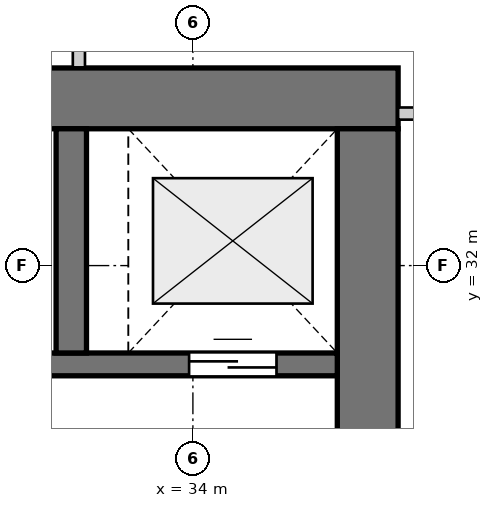
"""IFC4 building model, lengths in metres.
Left out: names, types, materials, properties, quantities, classifications, styles, units other than length and angle.
Written with IfcOpenShell. Run it as: python <this file> out.ifc"""

import sys

from ifc_helpers import new_model, si_unit, direction, frame, frame_2d, origin, place, context, subcontext, project, spatial, rectangle, extrude, source, transform, mapped, element, fill, save


model = new_model("IFC4")
c1 = context("Model", 3, precision=1e-05, world=origin(), true_north=direction((0.0, 1.0)))
c2 = subcontext(c1, "Body", "Model", "MODEL_VIEW")
j1 = project(units=[si_unit("LENGTHUNIT", "METRE"), si_unit("PLANEANGLEUNIT", "RADIAN")], contexts=[c1])
p1 = place(None, origin())
s1 = spatial("IfcSite", under=j1, at=p1, CompositionType="ELEMENT")
p2 = place(p1, origin())
s2 = spatial("IfcBuilding", under=s1, at=p2, CompositionType="ELEMENT")
p3 = place(p2, frame((0.0, 0.0, -4.2)))
s3 = spatial("IfcBuildingStorey", under=s2, at=p3, CompositionType="ELEMENT", Elevation=-4.2)
p4 = place(p3, frame((36.7, 34.2, 0.0), z_axis=(0.0, 0.0, 1.0), x_axis=(-1.0, 0.0, 0.0)))
e1 = element("IfcWall", 1, at=p4, inside=s3, PredefinedType="SHEAR", context=c2, shape_type="SweptSolid", body=[
    extrude(rectangle(XDim=12.7, YDim=0.8, at=frame_2d((6.35, 0.0))), origin(), (0.0, 0.0, 1.0), 3.9),
])
p5 = place(p3, frame((36.3, 18.2, 0.0), z_axis=(0.0, 0.0, 1.0), x_axis=(0.0, 1.0, 0.0)))
e2 = element("IfcWall", 2, at=p5, inside=s3, PredefinedType="SHEAR", context=c2, shape_type="SweptSolid", body=[
    extrude(rectangle(XDim=15.6, YDim=0.8, at=frame_2d((7.8, 0.0))), origin(), (0.0, 0.0, 1.0), 3.9),
])
p6 = place(p5, frame((4.25, 0.0, 0.0)))
e3 = element("IfcOpeningElement", 3, at=p6, cuts=e2, PredefinedType="OPENING", context=c2, shape_type="SweptSolid", body=[
    extrude(rectangle(XDim=1.1, YDim=2.15, at=frame_2d((0.55, 1.075))), frame((0.0, 0.41, 0.0), z_axis=(0.0, -1.0, 0.0), x_axis=(1.0, 0.0, 0.0)), (0.0, 0.0, 1.0), 0.82),
])
p7 = place(p5, frame((10.25, 0.0, 0.0)))
e4 = element("IfcOpeningElement", 4, at=p7, cuts=e2, PredefinedType="OPENING", context=c2, shape_type="SweptSolid", body=[
    extrude(rectangle(XDim=1.1, YDim=2.15, at=frame_2d((0.55, 1.075))), frame((0.0, 0.41, 0.0), z_axis=(0.0, -1.0, 0.0), x_axis=(1.0, 0.0, 0.0)), (0.0, 0.0, 1.0), 0.82),
])
p8 = place(p3, frame((24.8, 30.7, 0.0), z_axis=(0.0, 0.0, 1.0), x_axis=(1.0, 0.0, 0.0)))
e5 = element("IfcWall", 5, at=p8, inside=s3, PredefinedType="SHEAR", context=c2, shape_type="SweptSolid", body=[
    extrude(rectangle(XDim=11.1, YDim=0.3, at=frame_2d((5.55, 0.0))), origin(), (0.0, 0.0, 1.0), 3.9),
])
p9 = place(p8, frame((6.22, 0.0, 0.0)))
e6 = element("IfcOpeningElement", 6, at=p9, cuts=e5, PredefinedType="OPENING", context=c2, shape_type="SweptSolid", body=[
    extrude(rectangle(XDim=0.98, YDim=2.15, at=frame_2d((0.49, 1.075))), frame((0.0, 0.16, 0.0), z_axis=(0.0, -1.0, 0.0), x_axis=(1.0, 0.0, 0.0)), (0.0, 0.0, 1.0), 0.32),
])
p10 = place(p8, frame((9.15, 0.0, 0.0)))
e7 = element("IfcOpeningElement", 7, at=p10, cuts=e5, PredefinedType="OPENING", context=c2, shape_type="SweptSolid", body=[
    extrude(rectangle(XDim=1.15, YDim=2.15, at=frame_2d((0.575, 1.075))), frame((0.0, 0.16, 0.0), z_axis=(0.0, -1.0, 0.0), x_axis=(1.0, 0.0, 0.0)), (0.0, 0.0, 1.0), 0.32),
])
p11 = place(p3, frame((32.4, 30.85, 0.0), z_axis=(0.0, 0.0, 1.0), x_axis=(0.0, 1.0, 0.0)))
e8 = element("IfcWall", 8, at=p11, inside=s3, PredefinedType="SHEAR", context=c2, shape_type="SweptSolid", body=[
    extrude(rectangle(XDim=2.95, YDim=0.4, at=frame_2d((1.475, 0.0))), origin(), (0.0, 0.0, 1.0), 3.9),
])
p12 = place(p3, frame((32.5, 34.608, 0.0), z_axis=(0.0, 0.0, 1.0), x_axis=(0.0, 1.0, 0.0)))
e9 = element("IfcWall", 9, at=p12, inside=s3, PredefinedType="PARTITIONING", context=c2, shape_type="SweptSolid", body=[
    extrude(rectangle(XDim=1.804, YDim=0.16, at=frame_2d((0.902, 0.0))), origin(), (0.0, 0.0, 1.0), 3.9),
])
p13 = place(p3, frame((36.7, 34.0, 0.0), z_axis=(0.0, 0.0, 1.0), x_axis=(1.0, 0.0, 0.0)))
e10 = element("IfcWall", 10, at=p13, inside=s3, PredefinedType="PARTITIONING", context=c2, shape_type="SweptSolid", body=[
    extrude(rectangle(XDim=2.5, YDim=0.16, at=frame_2d((1.25, 0.0))), origin(), (0.0, 0.0, 1.0), 3.9),
])
p14 = place(p13, frame((0.65, 0.0, 0.0)))
e11 = element("IfcOpeningElement", 11, at=p14, cuts=e10, PredefinedType="OPENING", context=c2, shape_type="SweptSolid", body=[
    extrude(rectangle(XDim=1.1, YDim=2.15, at=frame_2d((0.55, 1.075))), frame((0.0, 0.09, 0.0), z_axis=(0.0, -1.0, 0.0), x_axis=(1.0, 0.0, 0.0)), (0.0, 0.0, 1.0), 0.18),
])
m1 = source(origin(), c2, "Body", "SweptSolid", [
    extrude(rectangle(XDim=1.15, YDim=2.15, at=frame_2d((0.575, 1.075))), frame((0.0, 0.025, 0.0), z_axis=(0.0, -1.0, 0.0), x_axis=(1.0, 0.0, 0.0)), (0.0, 0.0, 1.0), 0.05),
])
p15 = place(p10, origin())
e12 = element("IfcDoor", 12, at=p15, inside=s3, OperationType="DOUBLE_DOOR_SLIDING", PredefinedType="DOOR", context=c2, shape_type="MappedRepresentation", body=[
    mapped(m1, transform((0.0, 0.0, 0.0), x_axis=(1.0, 0.0, 0.0), y_axis=(0.0, 1.0, 0.0), z_axis=(0.0, 0.0, 1.0), scale=1.0)),
])
fill(e7, e12)
save(model, sys.argv[1])
